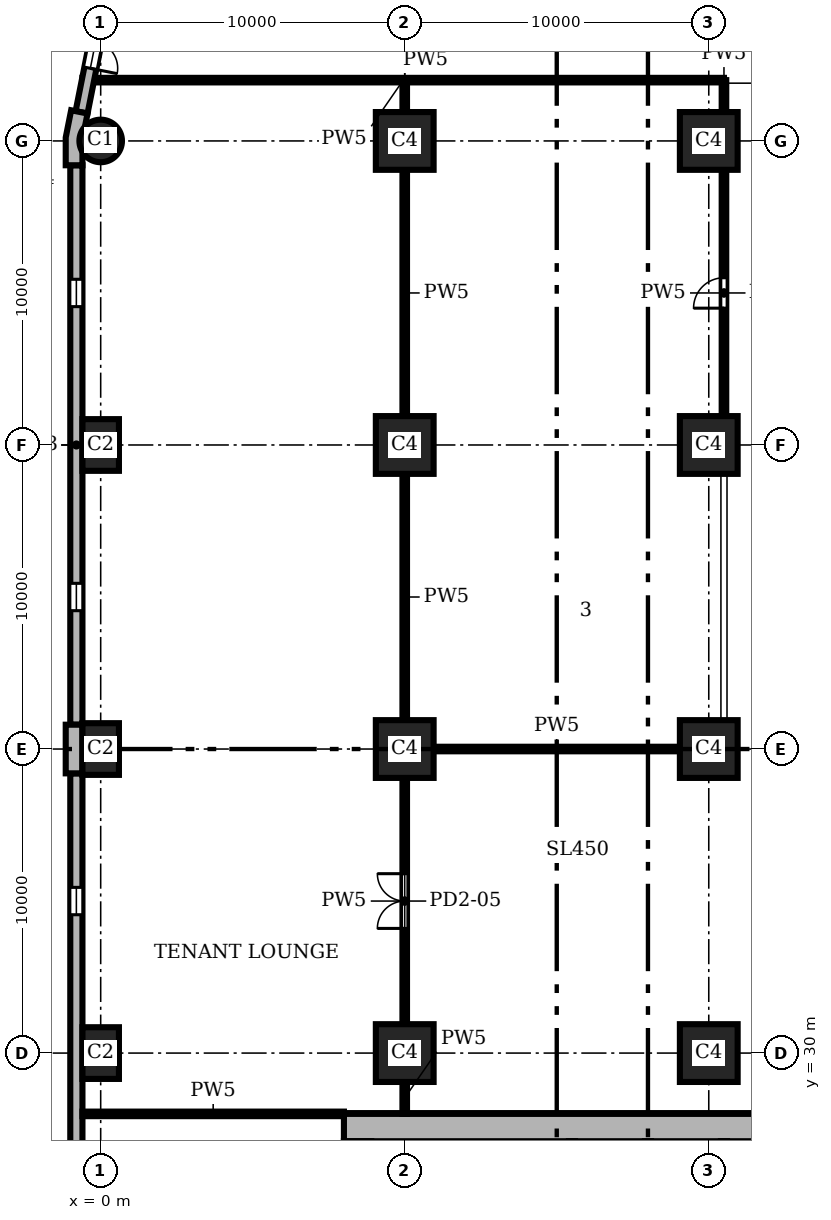
"""IFC4 building model, lengths in metres.
Left out: names, types, materials, properties, quantities, classifications, styles, units other than length and angle.
Written with IfcOpenShell. Run it as: python <this file> out.ifc"""

import sys

from ifc_helpers import new_model, si_unit, direction, frame, frame_2d, origin, origin_2d, place, context, subcontext, project, spatial, polyline, rectangle, circle, outline, extrude, element, fill, save


model = new_model("IFC4")
c1 = context("Model", 3, precision=1e-05, world=origin(), true_north=direction((0.0, 1.0)))
c2 = subcontext(c1, "Body", "Model", "MODEL_VIEW")
j1 = project(units=[si_unit("LENGTHUNIT", "METRE"), si_unit("PLANEANGLEUNIT", "RADIAN")], contexts=[c1])
p1 = place(None, origin())
s1 = spatial("IfcSite", under=j1, at=p1, CompositionType="ELEMENT")
p2 = place(p1, origin())
s2 = spatial("IfcBuilding", under=s1, at=p2, CompositionType="ELEMENT")
p3 = place(p2, origin())
s3 = spatial("IfcBuildingStorey", under=s2, at=p3, CompositionType="ELEMENT", Elevation=0.0)
p4 = place(p3, frame((0.0, 60.0, 0.0), z_axis=(0.0, 0.0, 1.0), x_axis=(1.0, 0.0, 0.0)))
e1 = element("IfcColumn", 1, at=p4, inside=s3, PredefinedType="COLUMN", context=c2, shape_type="SweptSolid", body=[
    extrude(circle(Radius=0.7, at=origin_2d()), origin(), (0.0, 0.0, 1.0), 6.0),
])
for number, where, z_axis, x_axis in (
    (2, (0.0, 50.0, 0.0), (0.0, 0.0, 1.0), (0.0, 1.0, 0.0)),
    (3, (0.0, 40.0, 0.0), (0.0, 0.0, 1.0), (0.0, 1.0, 0.0)),
    (4, (0.0, 30.0, 0.0), (0.0, 0.0, 1.0), (0.0, 1.0, 0.0)),
):
    element("IfcColumn", number, at=place(p3, frame(where, z_axis=z_axis, x_axis=x_axis)), inside=s3, PredefinedType="COLUMN", context=c2, shape_type="SweptSolid", body=[
        extrude(rectangle(XDim=1.7, YDim=1.2, at=origin_2d()), origin(), (0.0, 0.0, 1.0), 6.0),
    ])
for number, where, z_axis, x_axis in (
    (5, (10.0, 30.0, 0.0), (0.0, 0.0, 1.0), (1.0, 0.0, 0.0)),
    (6, (10.0, 40.0, 0.0), (0.0, 0.0, 1.0), (1.0, 0.0, 0.0)),
    (7, (10.0, 50.0, 0.0), (0.0, 0.0, 1.0), (1.0, 0.0, 0.0)),
    (8, (10.0, 60.0, 0.0), (0.0, 0.0, 1.0), (1.0, 0.0, 0.0)),
    (9, (20.0, 30.0, 0.0), (0.0, 0.0, 1.0), (1.0, 0.0, 0.0)),
    (10, (20.0, 40.0, 0.0), (0.0, 0.0, 1.0), (1.0, 0.0, 0.0)),
    (11, (20.0, 50.0, 0.0), (0.0, 0.0, 1.0), (1.0, 0.0, 0.0)),
    (12, (20.0, 60.0, 0.0), (0.0, 0.0, 1.0), (1.0, 0.0, 0.0)),
):
    element("IfcColumn", number, at=place(p3, frame(where, z_axis=z_axis, x_axis=x_axis)), inside=s3, PredefinedType="COLUMN", context=c2, shape_type="SweptSolid", body=[
        extrude(rectangle(XDim=1.9, YDim=1.9, at=origin_2d()), origin(), (0.0, 0.0, 1.0), 6.0),
    ])
p5 = place(p3, frame((28.0, 27.55, 0.0), z_axis=(0.0, 0.0, 1.0), x_axis=(-1.0, 0.0, 0.0)))
e13 = element("IfcWall", 13, at=p5, inside=s3, PredefinedType="SHEAR", context=c2, shape_type="SweptSolid", body=[
    extrude(rectangle(XDim=20.0, YDim=0.9, at=frame_2d((10.0, 0.0))), origin(), (0.0, 0.0, 1.0), 6.0),
])
p6 = place(p3, origin())
e14 = element("IfcWall", 14, at=p6, inside=s3, PredefinedType="SOLIDWALL", context=c2, shape_type="SweptSolid", body=[
    extrude(outline(polyline([(-0.825, 60.98), (-0.972, 61.009), (-1.15, 60.113), (-1.15, 59.2), (-1.0, 59.2), (-0.6, 59.2), (-0.6, 60.059), (-0.432, 60.902), (-0.825, 60.98)])), origin(), (0.0, 0.0, 1.0), 6.0),
])
e15 = element("IfcWall", 15, at=p6, inside=s3, PredefinedType="SOLIDWALL", context=c2, shape_type="SweptSolid", body=[
    extrude(outline(polyline([(-1.0, 40.8), (-1.15, 40.8), (-1.15, 40.0), (-1.15, 39.2), (-1.0, 39.2), (-0.6, 39.2), (-0.6, 40.0), (-0.6, 40.8), (-1.0, 40.8)])), origin(), (0.0, 0.0, 1.0), 6.0),
])
p7 = place(p3, frame((0.299, 65.602, 0.0), z_axis=(0.0, 0.0, 1.0), x_axis=(-0.195098533057, -0.98078364709, 0.0)))
e16 = element("IfcWall", 16, at=p7, inside=s3, PredefinedType="SOLIDWALL", context=c2, shape_type="SweptSolid", body=[
    extrude(rectangle(XDim=4.753, YDim=0.4, at=frame_2d((2.376, 0.0))), origin(), (0.0, 0.0, 1.0), 6.0),
])
p8 = place(p7, frame((1.476, 0.0, 0.0)))
e17 = element("IfcOpeningElement", 17, at=p8, cuts=e16, PredefinedType="OPENING", context=c2, shape_type="SweptSolid", body=[
    extrude(rectangle(XDim=1.8, YDim=2.4, at=frame_2d((0.9, 1.2))), frame((0.0, 0.21, 0.0), z_axis=(0.0, -1.0, 0.0), x_axis=(1.0, 0.0, 0.0)), (0.0, 0.0, 1.0), 0.42),
])
p9 = place(p3, frame((-0.8, 59.2, 0.0), z_axis=(0.0, 0.0, 1.0), x_axis=(0.0, -1.0, 0.0)))
e18 = element("IfcWall", 18, at=p9, inside=s3, PredefinedType="SOLIDWALL", context=c2, shape_type="SweptSolid", body=[
    extrude(rectangle(XDim=18.4, YDim=0.4, at=frame_2d((9.2, 0.0))), origin(), (0.0, 0.0, 1.0), 6.0),
])
p10 = place(p9, frame((3.75, 0.0, 1.0)))
e19 = element("IfcOpeningElement", 19, at=p10, cuts=e18, PredefinedType="OPENING", context=c2, shape_type="SweptSolid", body=[
    extrude(rectangle(XDim=0.9, YDim=4.2, at=frame_2d((0.45, 2.1))), frame((0.0, 0.21, 0.0), z_axis=(0.0, -1.0, 0.0), x_axis=(1.0, 0.0, 0.0)), (0.0, 0.0, 1.0), 0.42),
])
p11 = place(p9, frame((13.75, 0.0, 1.0)))
e20 = element("IfcOpeningElement", 20, at=p11, cuts=e18, PredefinedType="OPENING", context=c2, shape_type="SweptSolid", body=[
    extrude(rectangle(XDim=0.9, YDim=4.2, at=frame_2d((0.45, 2.1))), frame((0.0, 0.21, 0.0), z_axis=(0.0, -1.0, 0.0), x_axis=(1.0, 0.0, 0.0)), (0.0, 0.0, 1.0), 0.42),
])
p12 = place(p3, frame((-0.8, 39.2, 0.0), z_axis=(0.0, 0.0, 1.0), x_axis=(0.0, -1.0, 0.0)))
e21 = element("IfcWall", 21, at=p12, inside=s3, PredefinedType="SOLIDWALL", context=c2, shape_type="SweptSolid", body=[
    extrude(rectangle(XDim=18.4, YDim=0.4, at=frame_2d((9.2, 0.0))), origin(), (0.0, 0.0, 1.0), 6.0),
])
p13 = place(p12, frame((3.75, 0.0, 1.0)))
e22 = element("IfcOpeningElement", 22, at=p13, cuts=e21, PredefinedType="OPENING", context=c2, shape_type="SweptSolid", body=[
    extrude(rectangle(XDim=0.9, YDim=4.2, at=frame_2d((0.45, 2.1))), frame((0.0, 0.21, 0.0), z_axis=(0.0, -1.0, 0.0), x_axis=(1.0, 0.0, 0.0)), (0.0, 0.0, 1.0), 0.42),
])
p14 = place(p12, frame((13.75, 0.0, 1.0)))
e23 = element("IfcOpeningElement", 23, at=p14, cuts=e21, PredefinedType="OPENING", context=c2, shape_type="SweptSolid", body=[
    extrude(rectangle(XDim=0.9, YDim=4.2, at=frame_2d((0.45, 2.1))), frame((0.0, 0.21, 0.0), z_axis=(0.0, -1.0, 0.0), x_axis=(1.0, 0.0, 0.0)), (0.0, 0.0, 1.0), 0.42),
])
p15 = place(p3, frame((10.0, 28.0, 0.0), z_axis=(0.0, 0.0, 1.0), x_axis=(0.0, 1.0, 0.0)))
e24 = element("IfcWall", 24, at=p15, inside=s3, PredefinedType="PARTITIONING", context=c2, shape_type="SweptSolid", body=[
    extrude(rectangle(XDim=1.05, YDim=0.15, at=frame_2d((0.525, 0.0))), origin(), (0.0, 0.0, 1.0), 5.55),
])
p16 = place(p3, frame((10.0, 30.95, 0.0), z_axis=(0.0, 0.0, 1.0), x_axis=(0.0, 1.0, 0.0)))
e25 = element("IfcWall", 25, at=p16, inside=s3, PredefinedType="PARTITIONING", context=c2, shape_type="SweptSolid", body=[
    extrude(rectangle(XDim=8.1, YDim=0.15, at=frame_2d((4.05, 0.0))), origin(), (0.0, 0.0, 1.0), 5.55),
])
p17 = place(p16, frame((3.15, 0.0, 0.0)))
e26 = element("IfcOpeningElement", 26, at=p17, cuts=e25, PredefinedType="OPENING", context=c2, shape_type="SweptSolid", body=[
    extrude(rectangle(XDim=1.8, YDim=2.1, at=frame_2d((0.9, 1.05))), frame((0.0, 0.085, 0.0), z_axis=(0.0, -1.0, 0.0), x_axis=(1.0, 0.0, 0.0)), (0.0, 0.0, 1.0), 0.17),
])
for number, where, z_axis, x_axis in (
    (27, (10.0, 40.95, 0.0), (0.0, 0.0, 1.0), (0.0, 1.0, 0.0)),
    (28, (10.0, 50.95, 0.0), (0.0, 0.0, 1.0), (0.0, 1.0, 0.0)),
):
    element("IfcWall", number, at=place(p3, frame(where, z_axis=z_axis, x_axis=x_axis)), inside=s3, PredefinedType="PARTITIONING", context=c2, shape_type="SweptSolid", body=[
        extrude(rectangle(XDim=8.1, YDim=0.15, at=frame_2d((4.05, 0.0))), origin(), (0.0, 0.0, 1.0), 5.55),
    ])
p18 = place(p3, frame((10.0, 60.95, 0.0), z_axis=(0.0, 0.0, 1.0), x_axis=(0.0, 1.0, 0.0)))
e29 = element("IfcWall", 29, at=p18, inside=s3, PredefinedType="PARTITIONING", context=c2, shape_type="SweptSolid", body=[
    extrude(rectangle(XDim=1.05, YDim=0.15, at=frame_2d((0.525, 0.0))), origin(), (0.0, 0.0, 1.0), 5.55),
])
p19 = place(p3, frame((20.5, 50.95, 0.0), z_axis=(0.0, 0.0, 1.0), x_axis=(0.0, 1.0, 0.0)))
e30 = element("IfcWall", 30, at=p19, inside=s3, PredefinedType="PARTITIONING", context=c2, shape_type="SweptSolid", body=[
    extrude(rectangle(XDim=8.1, YDim=0.15, at=frame_2d((4.05, 0.0))), origin(), (0.0, 0.0, 1.0), 5.55),
])
p20 = place(p19, frame((3.55, 0.0, 0.0)))
e31 = element("IfcOpeningElement", 31, at=p20, cuts=e30, PredefinedType="OPENING", context=c2, shape_type="SweptSolid", body=[
    extrude(rectangle(XDim=1.0, YDim=2.1, at=frame_2d((0.5, 1.05))), frame((0.0, 0.085, 0.0), z_axis=(0.0, -1.0, 0.0), x_axis=(1.0, 0.0, 0.0)), (0.0, 0.0, 1.0), 0.17),
])
p21 = place(p3, frame((20.5, 60.95, 0.0), z_axis=(0.0, 0.0, 1.0), x_axis=(0.0, 1.0, 0.0)))
e32 = element("IfcWall", 32, at=p21, inside=s3, PredefinedType="PARTITIONING", context=c2, shape_type="SweptSolid", body=[
    extrude(rectangle(XDim=1.05, YDim=0.15, at=frame_2d((0.525, 0.0))), origin(), (0.0, 0.0, 1.0), 5.55),
])
p22 = place(p3, frame((10.95, 40.0, 0.0), z_axis=(0.0, 0.0, 1.0), x_axis=(1.0, 0.0, 0.0)))
e33 = element("IfcWall", 33, at=p22, inside=s3, PredefinedType="PARTITIONING", context=c2, shape_type="SweptSolid", body=[
    extrude(rectangle(XDim=8.1, YDim=0.15, at=frame_2d((4.05, 0.0))), origin(), (0.0, 0.0, 1.0), 5.55),
])
p23 = place(p3, frame((-0.6, 62.0, 0.0), z_axis=(0.0, 0.0, 1.0), x_axis=(1.0, 0.0, 0.0)))
e34 = element("IfcWall", 34, at=p23, inside=s3, PredefinedType="PARTITIONING", context=c2, shape_type="SweptSolid", body=[
    extrude(rectangle(XDim=21.1, YDim=0.15, at=frame_2d((10.55, 0.0))), origin(), (0.0, 0.0, 1.0), 5.55),
])
p24 = place(p3, frame((-0.6, 28.0, 0.0), z_axis=(0.0, 0.0, 1.0), x_axis=(1.0, 0.0, 0.0)))
e35 = element("IfcWall", 35, at=p24, inside=s3, PredefinedType="PARTITIONING", context=c2, shape_type="SweptSolid", body=[
    extrude(rectangle(XDim=8.6, YDim=0.15, at=frame_2d((4.3, 0.0))), origin(), (0.0, 0.0, 1.0), 5.55),
])
p25 = place(p8, origin())
e36 = element("IfcDoor", 36, at=p25, inside=s3, OperationType="DOUBLE_DOOR_DOUBLE_SWING", PredefinedType="DOOR", context=c2, shape_type="SweptSolid", body=[
    extrude(rectangle(XDim=1.8, YDim=2.4, at=frame_2d((0.9, 1.2))), frame((0.0, 0.025, 0.0), z_axis=(0.0, -1.0, 0.0), x_axis=(1.0, 0.0, 0.0)), (0.0, 0.0, 1.0), 0.05),
])
fill(e17, e36)
p26 = place(p10, origin())
e37 = element("IfcWindow", 37, at=p26, inside=s3, PartitioningType="SINGLE_PANEL", PredefinedType="WINDOW", context=c2, shape_type="SweptSolid", body=[
    extrude(rectangle(XDim=0.9, YDim=4.2, at=frame_2d((0.45, 2.1))), frame((0.0, 0.16, 0.0), z_axis=(0.0, -1.0, 0.0), x_axis=(1.0, 0.0, 0.0)), (0.0, 0.0, 1.0), 0.06),
])
fill(e19, e37)
p27 = place(p11, origin())
e38 = element("IfcWindow", 38, at=p27, inside=s3, PartitioningType="SINGLE_PANEL", PredefinedType="WINDOW", context=c2, shape_type="SweptSolid", body=[
    extrude(rectangle(XDim=0.9, YDim=4.2, at=frame_2d((0.45, 2.1))), frame((0.0, 0.16, 0.0), z_axis=(0.0, -1.0, 0.0), x_axis=(1.0, 0.0, 0.0)), (0.0, 0.0, 1.0), 0.06),
])
fill(e20, e38)
p28 = place(p13, origin())
e39 = element("IfcWindow", 39, at=p28, inside=s3, PartitioningType="SINGLE_PANEL", PredefinedType="WINDOW", context=c2, shape_type="SweptSolid", body=[
    extrude(rectangle(XDim=0.9, YDim=4.2, at=frame_2d((0.45, 2.1))), frame((0.0, 0.16, 0.0), z_axis=(0.0, -1.0, 0.0), x_axis=(1.0, 0.0, 0.0)), (0.0, 0.0, 1.0), 0.06),
])
fill(e22, e39)
p29 = place(p17, origin())
e40 = element("IfcDoor", 40, at=p29, inside=s3, OperationType="DOUBLE_DOOR_SINGLE_SWING", PredefinedType="DOOR", context=c2, shape_type="SweptSolid", body=[
    extrude(rectangle(XDim=1.8, YDim=2.1, at=frame_2d((0.9, 1.05))), frame((0.0, 0.025, 0.0), z_axis=(0.0, -1.0, 0.0), x_axis=(1.0, 0.0, 0.0)), (0.0, 0.0, 1.0), 0.05),
])
fill(e26, e40)
p30 = place(p20, origin())
e41 = element("IfcDoor", 41, at=p30, inside=s3, OperationType="SINGLE_SWING_LEFT", PredefinedType="DOOR", context=c2, shape_type="SweptSolid", body=[
    extrude(rectangle(XDim=1.0, YDim=2.1, at=frame_2d((0.5, 1.05))), frame((0.0, 0.025, 0.0), z_axis=(0.0, -1.0, 0.0), x_axis=(1.0, 0.0, 0.0)), (0.0, 0.0, 1.0), 0.05),
])
fill(e31, e41)
save(model, sys.argv[1])
